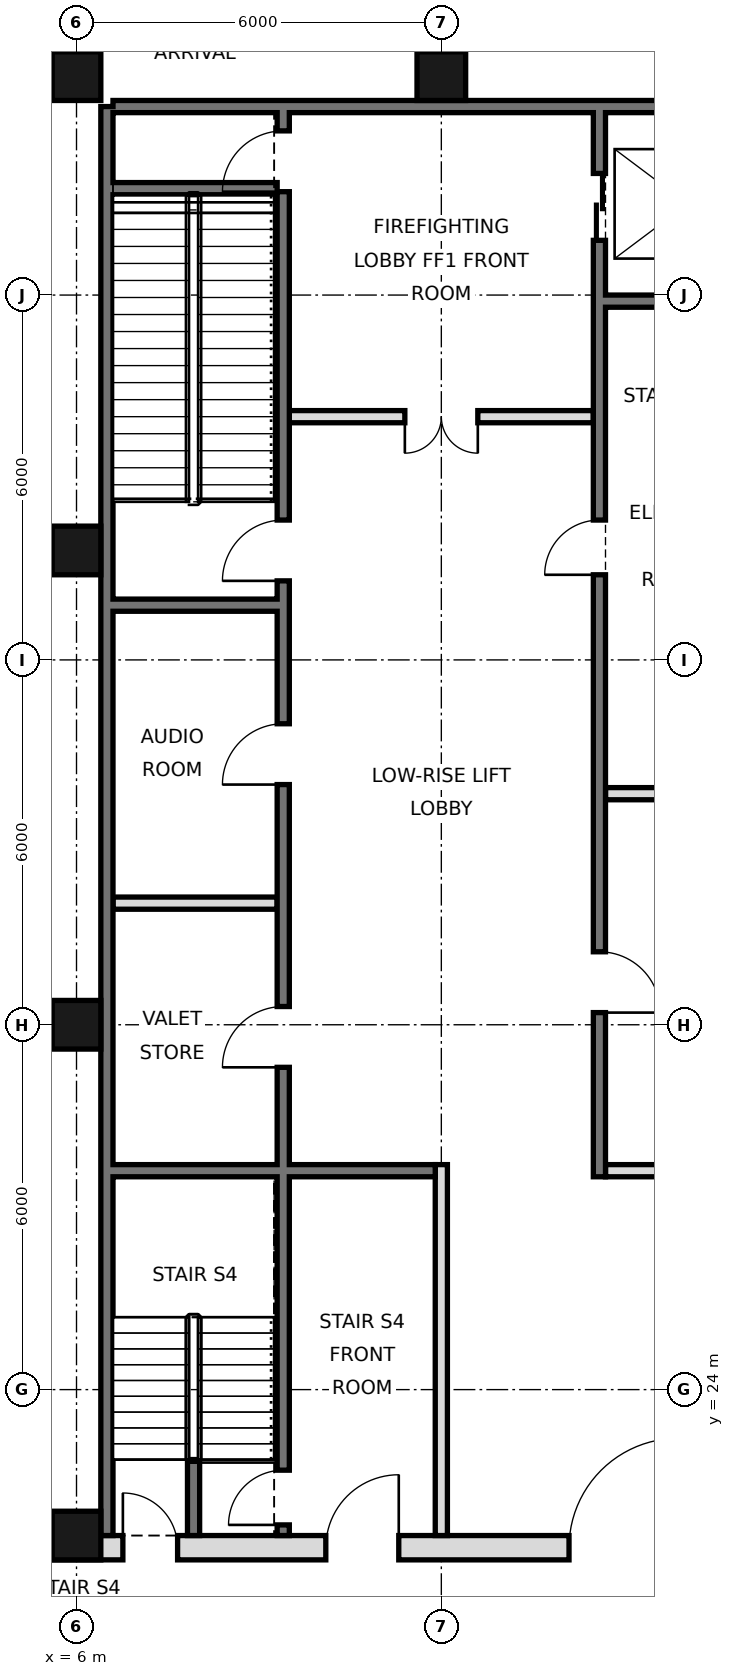
"""IFC4 building model, lengths in metres.
Left out: names, types, materials, properties, quantities, classifications, styles, units other than length and angle.
Written with IfcOpenShell. Run it as: python <this file> out.ifc"""

import sys

from ifc_helpers import new_model, si_unit, direction, frame, frame_2d, origin, origin_2d, place, context, subcontext, project, spatial, rectangle, hollow_rectangle, extrude, element, fill, save


model = new_model("IFC4")
c1 = context("Model", 3, precision=1e-05, world=origin(), true_north=direction((0.0, 1.0)))
c2 = subcontext(c1, "Body", "Model", "MODEL_VIEW")
j1 = project(units=[si_unit("LENGTHUNIT", "METRE"), si_unit("PLANEANGLEUNIT", "RADIAN")], contexts=[c1])
p1 = place(None, origin())
s1 = spatial("IfcSite", under=j1, at=p1, CompositionType="ELEMENT")
p2 = place(p1, origin())
s2 = spatial("IfcBuilding", under=s1, at=p2, CompositionType="ELEMENT")
p3 = place(p2, frame((0.0, 0.0, 331.2)))
s3 = spatial("IfcBuildingStorey", under=s2, at=p3, CompositionType="ELEMENT", Elevation=331.2)
for number, where, z_axis, x_axis in (
    (1, (6.0, 21.6, 0.0), (0.0, 0.0, 1.0), (1.0, 0.0, 0.0)),
    (2, (6.0, 30.0, 0.0), (0.0, 0.0, 1.0), (1.0, 0.0, 0.0)),
    (3, (6.0, 37.8, 0.0), (0.0, 0.0, 1.0), (1.0, 0.0, 0.0)),
    (4, (6.0, 45.6, 0.0), (0.0, 0.0, 1.0), (1.0, 0.0, 0.0)),
    (5, (12.0, 45.6, 0.0), (0.0, 0.0, 1.0), (1.0, 0.0, 0.0)),
):
    element("IfcColumn", number, at=place(p3, frame(where, z_axis=z_axis, x_axis=x_axis)), inside=s3, PredefinedType="COLUMN", context=c2, shape_type="SweptSolid", body=[
        extrude(hollow_rectangle(XDim=0.8, YDim=0.8, WallThickness=0.025, at=origin_2d()), origin(), (0.0, 0.0, 1.0), 6.6),
    ])
p4 = place(p3, frame((6.5, 21.6, 0.0), z_axis=(0.0, 0.0, 1.0), x_axis=(0.0, 1.0, 0.0)))
e6 = element("IfcWall", 6, at=p4, inside=s3, PredefinedType="SOLIDWALL", context=c2, shape_type="SweptSolid", body=[
    extrude(rectangle(XDim=23.5, YDim=0.2, at=frame_2d((11.75, 0.0))), origin(), (0.0, 0.0, 1.0), 6.35),
])
p5 = place(p3, frame((6.6, 45.1, 0.0), z_axis=(0.0, 0.0, 1.0), x_axis=(1.0, 0.0, 0.0)))
e7 = element("IfcWall", 7, at=p5, inside=s3, PredefinedType="SOLIDWALL", context=c2, shape_type="SweptSolid", body=[
    extrude(rectangle(XDim=34.8, YDim=0.2, at=frame_2d((17.4, 0.0))), origin(), (0.0, 0.0, 1.0), 6.35),
])
p6 = place(p3, frame((5.6, 21.4, 0.0), z_axis=(0.0, 0.0, 1.0), x_axis=(1.0, 0.0, 0.0)))
e8 = element("IfcWall", 8, at=p6, inside=s3, PredefinedType="SOLIDWALL", context=c2, shape_type="SweptSolid", body=[
    extrude(rectangle(XDim=36.8, YDim=0.4, at=frame_2d((18.4, 0.0))), origin(), (0.0, 0.0, 1.0), 6.35),
])
p7 = place(p6, frame((8.5, 0.0, 0.0)))
e9 = element("IfcOpeningElement", 9, at=p7, cuts=e8, PredefinedType="OPENING", context=c2, shape_type="SweptSolid", body=[
    extrude(rectangle(XDim=1.8, YDim=2.1, at=frame_2d((0.9, 1.05))), frame((0.0, 0.21, 0.0), z_axis=(0.0, -1.0, 0.0), x_axis=(1.0, 0.0, 0.0)), (0.0, 0.0, 1.0), 0.42),
])
p8 = place(p6, frame((17.5, 0.0, 0.0)))
e10 = element("IfcOpeningElement", 10, at=p8, cuts=e8, PredefinedType="OPENING", context=c2, shape_type="SweptSolid", body=[
    extrude(rectangle(XDim=1.8, YDim=2.1, at=frame_2d((0.9, 1.05))), frame((0.0, 0.21, 0.0), z_axis=(0.0, -1.0, 0.0), x_axis=(1.0, 0.0, 0.0)), (0.0, 0.0, 1.0), 0.42),
])
p9 = place(p6, frame((26.5, 0.0, 0.0)))
e11 = element("IfcOpeningElement", 11, at=p9, cuts=e8, PredefinedType="OPENING", context=c2, shape_type="SweptSolid", body=[
    extrude(rectangle(XDim=1.8, YDim=2.1, at=frame_2d((0.9, 1.05))), frame((0.0, 0.21, 0.0), z_axis=(0.0, -1.0, 0.0), x_axis=(1.0, 0.0, 0.0)), (0.0, 0.0, 1.0), 0.42),
])
p10 = place(p6, frame((4.5, 0.0, 0.0)))
e12 = element("IfcOpeningElement", 12, at=p10, cuts=e8, PredefinedType="OPENING", context=c2, shape_type="SweptSolid", body=[
    extrude(rectangle(XDim=1.2, YDim=2.1, at=frame_2d((0.6, 1.05))), frame((0.0, 0.21, 0.0), z_axis=(0.0, -1.0, 0.0), x_axis=(1.0, 0.0, 0.0)), (0.0, 0.0, 1.0), 0.42),
])
p11 = place(p6, frame((31.1, 0.0, 0.0)))
e13 = element("IfcOpeningElement", 13, at=p11, cuts=e8, PredefinedType="OPENING", context=c2, shape_type="SweptSolid", body=[
    extrude(rectangle(XDim=1.2, YDim=2.1, at=frame_2d((0.6, 1.05))), frame((0.0, 0.21, 0.0), z_axis=(0.0, -1.0, 0.0), x_axis=(1.0, 0.0, 0.0)), (0.0, 0.0, 1.0), 0.42),
])
p12 = place(p6, frame((1.163, 0.0, 0.0)))
e14 = element("IfcOpeningElement", 14, at=p12, cuts=e8, PredefinedType="OPENING", context=c2, shape_type="SweptSolid", body=[
    extrude(rectangle(XDim=0.9, YDim=2.1, at=frame_2d((0.45, 1.05))), frame((0.0, 0.21, 0.0), z_axis=(0.0, -1.0, 0.0), x_axis=(1.0, 0.0, 0.0)), (0.0, 0.0, 1.0), 0.42),
])
p13 = place(p6, frame((34.738, 0.0, 0.0)))
e15 = element("IfcOpeningElement", 15, at=p13, cuts=e8, PredefinedType="OPENING", context=c2, shape_type="SweptSolid", body=[
    extrude(rectangle(XDim=0.9, YDim=2.1, at=frame_2d((0.45, 1.05))), frame((0.0, 0.21, 0.0), z_axis=(0.0, -1.0, 0.0), x_axis=(1.0, 0.0, 0.0)), (0.0, 0.0, 1.0), 0.42),
])
p14 = place(p3, frame((12.0, 21.6, 0.0), z_axis=(0.0, 0.0, 1.0), x_axis=(0.0, 1.0, 0.0)))
e16 = element("IfcWall", 16, at=p14, inside=s3, PredefinedType="PARTITIONING", context=c2, shape_type="SweptSolid", body=[
    extrude(rectangle(XDim=6.1, YDim=0.2, at=frame_2d((3.05, 0.0))), origin(), (0.0, 0.0, 1.0), 6.35),
])
p15 = place(p3, frame((14.6, 27.5, 0.0), z_axis=(0.0, 0.0, 1.0), x_axis=(0.0, 1.0, 0.0)))
e17 = element("IfcWall", 17, at=p15, inside=s3, PredefinedType="SOLIDWALL", context=c2, shape_type="SweptSolid", body=[
    extrude(rectangle(XDim=17.5, YDim=0.2, at=frame_2d((8.75, 0.0))), origin(), (0.0, 0.0, 1.0), 6.35),
])
p16 = place(p15, frame((15.4, 0.0, 0.0)))
e18 = element("IfcOpeningElement", 18, at=p16, cuts=e17, PredefinedType="OPENING", context=c2, shape_type="SweptSolid", body=[
    extrude(rectangle(XDim=1.1, YDim=2.1, at=frame_2d((0.55, 1.05))), frame((0.0, 0.11, 0.0), z_axis=(0.0, -1.0, 0.0), x_axis=(1.0, 0.0, 0.0)), (0.0, 0.0, 1.0), 0.22),
])
p17 = place(p15, frame((2.7, 0.0, 0.0)))
e19 = element("IfcOpeningElement", 19, at=p17, cuts=e17, PredefinedType="OPENING", context=c2, shape_type="SweptSolid", body=[
    extrude(rectangle(XDim=1.0, YDim=2.1, at=frame_2d((0.5, 1.05))), frame((0.0, 0.11, 0.0), z_axis=(0.0, -1.0, 0.0), x_axis=(1.0, 0.0, 0.0)), (0.0, 0.0, 1.0), 0.22),
])
p18 = place(p15, frame((9.9, 0.0, 0.0)))
e20 = element("IfcOpeningElement", 20, at=p18, cuts=e17, PredefinedType="OPENING", context=c2, shape_type="SweptSolid", body=[
    extrude(rectangle(XDim=0.9, YDim=2.1, at=frame_2d((0.45, 1.05))), frame((0.0, 0.11, 0.0), z_axis=(0.0, -1.0, 0.0), x_axis=(1.0, 0.0, 0.0)), (0.0, 0.0, 1.0), 0.22),
])
p19 = place(p3, frame((7.925, 21.6, 0.0), z_axis=(0.0, 0.0, 1.0), x_axis=(0.0, 1.0, 0.0)))
e21 = element("IfcWall", 21, at=p19, inside=s3, PredefinedType="SOLIDWALL", context=c2, shape_type="SweptSolid", body=[
    extrude(rectangle(XDim=1.25, YDim=0.2, at=frame_2d((0.625, 0.0))), origin(), (0.0, 0.0, 1.0), 6.35),
])
p20 = place(p3, frame((9.4, 21.6, 0.0), z_axis=(0.0, 0.0, 1.0), x_axis=(0.0, 1.0, 0.0)))
e22 = element("IfcWall", 22, at=p20, inside=s3, PredefinedType="SOLIDWALL", context=c2, shape_type="SweptSolid", body=[
    extrude(rectangle(XDim=23.4, YDim=0.2, at=frame_2d((11.7, 0.0))), origin(), (0.0, 0.0, 1.0), 6.35),
])
p21 = place(p20, frame((7.7, 0.0, 0.0)))
e23 = element("IfcOpeningElement", 23, at=p21, cuts=e22, PredefinedType="OPENING", context=c2, shape_type="SweptSolid", body=[
    extrude(rectangle(XDim=1.0, YDim=2.1, at=frame_2d((0.5, 1.05))), frame((0.0, 0.11, 0.0), z_axis=(0.0, -1.0, 0.0), x_axis=(1.0, 0.0, 0.0)), (0.0, 0.0, 1.0), 0.22),
])
p22 = place(p20, frame((12.35, 0.0, 0.0)))
e24 = element("IfcOpeningElement", 24, at=p22, cuts=e22, PredefinedType="OPENING", context=c2, shape_type="SweptSolid", body=[
    extrude(rectangle(XDim=1.0, YDim=2.1, at=frame_2d((0.5, 1.05))), frame((0.0, 0.11, 0.0), z_axis=(0.0, -1.0, 0.0), x_axis=(1.0, 0.0, 0.0)), (0.0, 0.0, 1.0), 0.22),
])
p23 = place(p20, frame((22.1, 0.0, 0.0)))
e25 = element("IfcOpeningElement", 25, at=p23, cuts=e22, PredefinedType="OPENING", context=c2, shape_type="SweptSolid", body=[
    extrude(rectangle(XDim=1.0, YDim=2.1, at=frame_2d((0.5, 1.05))), frame((0.0, 0.11, 0.0), z_axis=(0.0, -1.0, 0.0), x_axis=(1.0, 0.0, 0.0)), (0.0, 0.0, 1.0), 0.22),
])
p24 = place(p20, frame((15.7, 0.0, 0.0)))
e26 = element("IfcOpeningElement", 26, at=p24, cuts=e22, PredefinedType="OPENING", context=c2, shape_type="SweptSolid", body=[
    extrude(rectangle(XDim=1.0, YDim=2.1, at=frame_2d((0.5, 1.05))), frame((0.0, 0.11, 0.0), z_axis=(0.0, -1.0, 0.0), x_axis=(1.0, 0.0, 0.0)), (0.0, 0.0, 1.0), 0.22),
])
p25 = place(p20, frame((0.175, 0.0, 0.0)))
e27 = element("IfcOpeningElement", 27, at=p25, cuts=e22, PredefinedType="OPENING", context=c2, shape_type="SweptSolid", body=[
    extrude(rectangle(XDim=0.9, YDim=2.1, at=frame_2d((0.45, 1.05))), frame((0.0, 0.11, 0.0), z_axis=(0.0, -1.0, 0.0), x_axis=(1.0, 0.0, 0.0)), (0.0, 0.0, 1.0), 0.22),
])
p26 = place(p3, frame((14.7, 27.6, 0.0), z_axis=(0.0, 0.0, 1.0), x_axis=(1.0, 0.0, 0.0)))
e28 = element("IfcWall", 28, at=p26, inside=s3, PredefinedType="PARTITIONING", context=c2, shape_type="SweptSolid", body=[
    extrude(rectangle(XDim=2.7, YDim=0.2, at=frame_2d((1.35, 0.0))), origin(), (0.0, 0.0, 1.0), 6.35),
])
p27 = place(p3, frame((6.6, 27.6, 0.0), z_axis=(0.0, 0.0, 1.0), x_axis=(1.0, 0.0, 0.0)))
e29 = element("IfcWall", 29, at=p27, inside=s3, PredefinedType="SOLIDWALL", context=c2, shape_type="SweptSolid", body=[
    extrude(rectangle(XDim=5.3, YDim=0.2, at=frame_2d((2.65, 0.0))), origin(), (0.0, 0.0, 1.0), 6.35),
])
p28 = place(p3, frame((6.6, 32.0, 0.0), z_axis=(0.0, 0.0, 1.0), x_axis=(1.0, 0.0, 0.0)))
e30 = element("IfcWall", 30, at=p28, inside=s3, PredefinedType="PARTITIONING", context=c2, shape_type="SweptSolid", body=[
    extrude(rectangle(XDim=2.7, YDim=0.2, at=frame_2d((1.35, 0.0))), origin(), (0.0, 0.0, 1.0), 6.35),
])
for number, where, z_axis, x_axis in (
    (31, (14.7, 33.8, 0.0), (0.0, 0.0, 1.0), (1.0, 0.0, 0.0)),
    (32, (6.6, 36.9, 0.0), (0.0, 0.0, 1.0), (1.0, 0.0, 0.0)),
):
    element("IfcWall", number, at=place(p3, frame(where, z_axis=z_axis, x_axis=x_axis)), inside=s3, PredefinedType="SOLIDWALL", context=c2, shape_type="SweptSolid", body=[
        extrude(rectangle(XDim=2.7, YDim=0.2, at=frame_2d((1.35, 0.0))), origin(), (0.0, 0.0, 1.0), 6.35),
    ])
p29 = place(p3, frame((9.5, 40.0, 0.0), z_axis=(0.0, 0.0, 1.0), x_axis=(1.0, 0.0, 0.0)))
e33 = element("IfcWall", 33, at=p29, inside=s3, PredefinedType="PARTITIONING", context=c2, shape_type="SweptSolid", body=[
    extrude(rectangle(XDim=5.0, YDim=0.2, at=frame_2d((2.5, 0.0))), origin(), (0.0, 0.0, 1.0), 6.35),
])
p30 = place(p29, frame((1.9, 0.0, 0.0)))
e34 = element("IfcOpeningElement", 34, at=p30, cuts=e33, PredefinedType="OPENING", context=c2, shape_type="SweptSolid", body=[
    extrude(rectangle(XDim=1.2, YDim=2.1, at=frame_2d((0.6, 1.05))), frame((0.0, 0.11, 0.0), z_axis=(0.0, -1.0, 0.0), x_axis=(1.0, 0.0, 0.0)), (0.0, 0.0, 1.0), 0.22),
])
p31 = place(p3, frame((14.7, 41.9, 0.0), z_axis=(0.0, 0.0, 1.0), x_axis=(1.0, 0.0, 0.0)))
e35 = element("IfcWall", 35, at=p31, inside=s3, PredefinedType="SOLIDWALL", context=c2, shape_type="SweptSolid", body=[
    extrude(rectangle(XDim=2.7, YDim=0.2, at=frame_2d((1.35, 0.0))), origin(), (0.0, 0.0, 1.0), 6.35),
])
p32 = place(p3, frame((6.6, 43.75, 0.0), z_axis=(0.0, 0.0, 1.0), x_axis=(1.0, 0.0, 0.0)))
e36 = element("IfcWall", 36, at=p32, inside=s3, PredefinedType="SOLIDWALL", context=c2, shape_type="SweptSolid", body=[
    extrude(rectangle(XDim=2.7, YDim=0.2, at=frame_2d((1.35, 0.0))), origin(), (0.0, 0.0, 1.0), 3.1),
])
p33 = place(p7, frame((1.8, 0.0, 0.0), z_axis=(0.0, 0.0, 1.0), x_axis=(-1.0, 0.0, 0.0)))
e37 = element("IfcDoor", 37, at=p33, inside=s3, OperationType="SINGLE_SWING_LEFT", PredefinedType="DOOR", context=c2, shape_type="SweptSolid", body=[
    extrude(rectangle(XDim=1.8, YDim=2.1, at=frame_2d((0.9, 1.05))), frame((0.0, 0.025, 0.0), z_axis=(0.0, -1.0, 0.0), x_axis=(1.0, 0.0, 0.0)), (0.0, 0.0, 1.0), 0.05),
])
fill(e9, e37)
p34 = place(p10, frame((1.2, 0.0, 0.0), z_axis=(0.0, 0.0, 1.0), x_axis=(-1.0, 0.0, 0.0)))
e38 = element("IfcDoor", 38, at=p34, inside=s3, OperationType="SINGLE_SWING_LEFT", PredefinedType="DOOR", context=c2, shape_type="SweptSolid", body=[
    extrude(rectangle(XDim=1.2, YDim=2.1, at=frame_2d((0.6, 1.05))), frame((0.0, 0.025, 0.0), z_axis=(0.0, -1.0, 0.0), x_axis=(1.0, 0.0, 0.0)), (0.0, 0.0, 1.0), 0.05),
])
fill(e12, e38)
p35 = place(p30, frame((1.2, 0.0, 0.0), z_axis=(0.0, 0.0, 1.0), x_axis=(-1.0, 0.0, 0.0)))
e39 = element("IfcDoor", 39, at=p35, inside=s3, OperationType="DOUBLE_DOOR_SINGLE_SWING", PredefinedType="DOOR", context=c2, shape_type="SweptSolid", body=[
    extrude(rectangle(XDim=1.2, YDim=2.1, at=frame_2d((0.6, 1.05))), frame((0.0, 0.025, 0.0), z_axis=(0.0, -1.0, 0.0), x_axis=(1.0, 0.0, 0.0)), (0.0, 0.0, 1.0), 0.05),
])
fill(e34, e39)
p36 = place(p16, origin())
e40 = element("IfcDoor", 40, at=p36, inside=s3, OperationType="DOUBLE_DOOR_SLIDING", PredefinedType="DOOR", context=c2, shape_type="SweptSolid", body=[
    extrude(rectangle(XDim=1.1, YDim=2.1, at=frame_2d((0.55, 1.05))), frame((0.0, 0.025, 0.0), z_axis=(0.0, -1.0, 0.0), x_axis=(1.0, 0.0, 0.0)), (0.0, 0.0, 1.0), 0.05),
])
fill(e18, e40)
p37 = place(p17, frame((1.0, 0.0, 0.0), z_axis=(0.0, 0.0, 1.0), x_axis=(-1.0, 0.0, 0.0)))
e41 = element("IfcDoor", 41, at=p37, inside=s3, OperationType="SINGLE_SWING_RIGHT", PredefinedType="DOOR", context=c2, shape_type="SweptSolid", body=[
    extrude(rectangle(XDim=1.0, YDim=2.1, at=frame_2d((0.5, 1.05))), frame((0.0, 0.025, 0.0), z_axis=(0.0, -1.0, 0.0), x_axis=(1.0, 0.0, 0.0)), (0.0, 0.0, 1.0), 0.05),
])
fill(e19, e41)
p38 = place(p21, origin())
e42 = element("IfcDoor", 42, at=p38, inside=s3, OperationType="SINGLE_SWING_LEFT", PredefinedType="DOOR", context=c2, shape_type="SweptSolid", body=[
    extrude(rectangle(XDim=1.0, YDim=2.1, at=frame_2d((0.5, 1.05))), frame((0.0, 0.025, 0.0), z_axis=(0.0, -1.0, 0.0), x_axis=(1.0, 0.0, 0.0)), (0.0, 0.0, 1.0), 0.05),
])
fill(e23, e42)
p39 = place(p22, origin())
e43 = element("IfcDoor", 43, at=p39, inside=s3, OperationType="SINGLE_SWING_LEFT", PredefinedType="DOOR", context=c2, shape_type="SweptSolid", body=[
    extrude(rectangle(XDim=1.0, YDim=2.1, at=frame_2d((0.5, 1.05))), frame((0.0, 0.025, 0.0), z_axis=(0.0, -1.0, 0.0), x_axis=(1.0, 0.0, 0.0)), (0.0, 0.0, 1.0), 0.05),
])
fill(e24, e43)
p40 = place(p23, origin())
e44 = element("IfcDoor", 44, at=p40, inside=s3, OperationType="SINGLE_SWING_LEFT", PredefinedType="DOOR", context=c2, shape_type="SweptSolid", body=[
    extrude(rectangle(XDim=1.0, YDim=2.1, at=frame_2d((0.5, 1.05))), frame((0.0, 0.025, 0.0), z_axis=(0.0, -1.0, 0.0), x_axis=(1.0, 0.0, 0.0)), (0.0, 0.0, 1.0), 0.05),
])
fill(e25, e44)
p41 = place(p24, origin())
e45 = element("IfcDoor", 45, at=p41, inside=s3, OperationType="SINGLE_SWING_LEFT", PredefinedType="DOOR", context=c2, shape_type="SweptSolid", body=[
    extrude(rectangle(XDim=1.0, YDim=2.1, at=frame_2d((0.5, 1.05))), frame((0.0, 0.025, 0.0), z_axis=(0.0, -1.0, 0.0), x_axis=(1.0, 0.0, 0.0)), (0.0, 0.0, 1.0), 0.05),
])
fill(e26, e45)
p42 = place(p12, origin())
e46 = element("IfcDoor", 46, at=p42, inside=s3, OperationType="SINGLE_SWING_LEFT", PredefinedType="DOOR", context=c2, shape_type="SweptSolid", body=[
    extrude(rectangle(XDim=0.9, YDim=2.1, at=frame_2d((0.45, 1.05))), frame((0.0, 0.025, 0.0), z_axis=(0.0, -1.0, 0.0), x_axis=(1.0, 0.0, 0.0)), (0.0, 0.0, 1.0), 0.05),
])
fill(e14, e46)
p43 = place(p25, origin())
e47 = element("IfcDoor", 47, at=p43, inside=s3, OperationType="SINGLE_SWING_LEFT", PredefinedType="DOOR", context=c2, shape_type="SweptSolid", body=[
    extrude(rectangle(XDim=0.9, YDim=2.1, at=frame_2d((0.45, 1.05))), frame((0.0, 0.025, 0.0), z_axis=(0.0, -1.0, 0.0), x_axis=(1.0, 0.0, 0.0)), (0.0, 0.0, 1.0), 0.05),
])
fill(e27, e47)
p44 = place(p18, origin())
e48 = element("IfcDoor", 48, at=p44, inside=s3, OperationType="SINGLE_SWING_LEFT", PredefinedType="DOOR", context=c2, shape_type="SweptSolid", body=[
    extrude(rectangle(XDim=0.9, YDim=2.1, at=frame_2d((0.45, 1.05))), frame((0.0, 0.025, 0.0), z_axis=(0.0, -1.0, 0.0), x_axis=(1.0, 0.0, 0.0)), (0.0, 0.0, 1.0), 0.05),
])
fill(e20, e48)
save(model, sys.argv[1])
